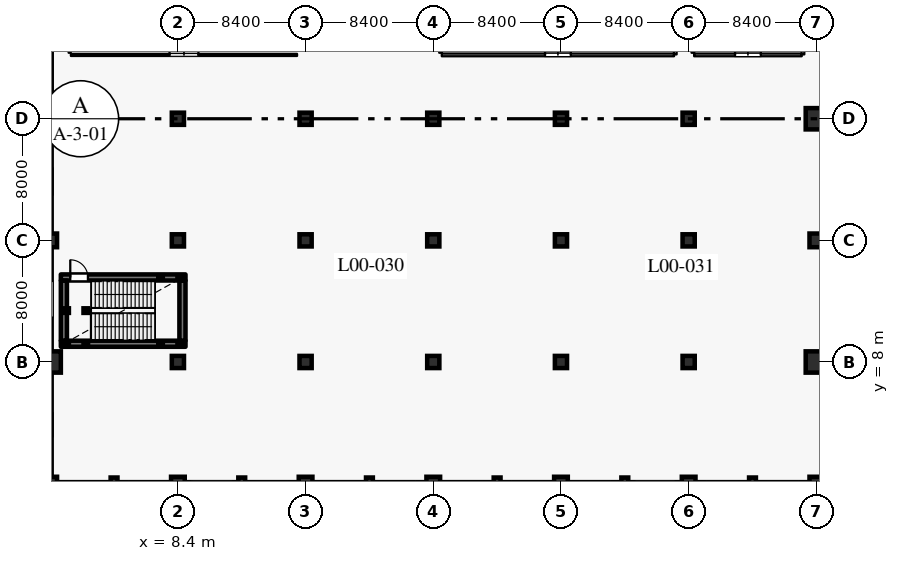
"""IFC4 building model, lengths in metres.
Left out: names, types, materials, properties, quantities, classifications, styles, units other than length and angle.
Written with IfcOpenShell. Run it as: python <this file> out.ifc"""

import sys

from ifc_helpers import new_model, si_unit, direction, frame, frame_2d, origin, origin_with_axes, origin_2d, place, context, subcontext, project, spatial, rectangle, hollow_rectangle, circle, extrude, element, fill, save


model = new_model("IFC4")
c1 = context("Model", 3, precision=1e-05, world=origin(), true_north=direction((0.0, 1.0)))
c2 = subcontext(c1, "Body", "Model", "MODEL_VIEW")
j1 = project(units=[si_unit("LENGTHUNIT", "METRE"), si_unit("PLANEANGLEUNIT", "RADIAN")], contexts=[c1])
p1 = place(None, origin())
s1 = spatial("IfcSite", under=j1, at=p1, CompositionType="ELEMENT")
p2 = place(p1, origin())
s2 = spatial("IfcBuilding", under=s1, at=p2, CompositionType="ELEMENT")
p3 = place(p2, origin())
s3 = spatial("IfcBuildingStorey", under=s2, at=p3, CompositionType="ELEMENT", Elevation=0.0)
p4 = place(p3, origin_with_axes())
e1 = element("IfcColumn", 1, at=p4, inside=s3, PredefinedType="COLUMN", context=c2, shape_type="SweptSolid", body=[
    extrude(rectangle(XDim=0.9, YDim=0.9, at=origin_2d()), origin(), (0.0, 0.0, 1.0), 6.0),
])
p5 = place(p3, frame((0.0, 8.0, 0.0), z_axis=(0.0, 0.0, 1.0), x_axis=(1.0, 0.0, 0.0)))
e2 = element("IfcColumn", 2, at=p5, inside=s3, PredefinedType="COLUMN", context=c2, shape_type="SweptSolid", body=[
    extrude(circle(Radius=0.7, at=origin_2d()), origin(), (0.0, 0.0, 1.0), 6.0),
])
p6 = place(p3, frame((0.0, 16.0, 0.0), z_axis=(0.0, 0.0, 1.0), x_axis=(1.0, 0.0, 0.0)))
e3 = element("IfcColumn", 3, at=p6, inside=s3, PredefinedType="COLUMN", context=c2, shape_type="SweptSolid", body=[
    extrude(rectangle(XDim=0.9, YDim=0.9, at=origin_2d()), origin(), (0.0, 0.0, 1.0), 6.0),
])
p7 = place(p3, frame((0.0, 24.0, 0.0), z_axis=(0.0, 0.0, 1.0), x_axis=(1.0, 0.0, 0.0)))
e4 = element("IfcColumn", 4, at=p7, inside=s3, PredefinedType="COLUMN", context=c2, shape_type="SweptSolid", body=[
    extrude(circle(Radius=0.7, at=origin_2d()), origin(), (0.0, 0.0, 1.0), 6.0),
])
p8 = place(p3, frame((4.2, 0.0, 0.0), z_axis=(0.0, 0.0, 1.0), x_axis=(1.0, 0.0, 0.0)))
e5 = element("IfcColumn", 5, at=p8, inside=s3, PredefinedType="PILASTER", context=c2, shape_type="SweptSolid", body=[
    extrude(rectangle(XDim=0.45, YDim=0.8, at=origin_2d()), origin(), (0.0, 0.0, 1.0), 6.0),
])
p9 = place(p3, frame((8.4, 0.0, 0.0), z_axis=(0.0, 0.0, 1.0), x_axis=(1.0, 0.0, 0.0)))
e6 = element("IfcColumn", 6, at=p9, inside=s3, PredefinedType="COLUMN", context=c2, shape_type="SweptSolid", body=[
    extrude(rectangle(XDim=0.9, YDim=0.9, at=origin_2d()), origin(), (0.0, 0.0, 1.0), 6.0),
])
for number, where, z_axis, x_axis in (
    (7, (8.4, 8.0, 0.0), (0.0, 0.0, 1.0), (1.0, 0.0, 0.0)),
    (8, (8.4, 16.0, 0.0), (0.0, 0.0, 1.0), (1.0, 0.0, 0.0)),
    (9, (8.4, 24.0, 0.0), (0.0, 0.0, 1.0), (1.0, 0.0, 0.0)),
):
    element("IfcColumn", number, at=place(p3, frame(where, z_axis=z_axis, x_axis=x_axis)), inside=s3, PredefinedType="COLUMN", context=c2, shape_type="SweptSolid", body=[
        extrude(rectangle(XDim=0.8, YDim=0.8, at=origin_2d()), origin(), (0.0, 0.0, 1.0), 6.0),
    ])
p10 = place(p3, frame((12.6, 0.0, 0.0), z_axis=(0.0, 0.0, 1.0), x_axis=(1.0, 0.0, 0.0)))
e10 = element("IfcColumn", 10, at=p10, inside=s3, PredefinedType="PILASTER", context=c2, shape_type="SweptSolid", body=[
    extrude(rectangle(XDim=0.45, YDim=0.8, at=origin_2d()), origin(), (0.0, 0.0, 1.0), 6.0),
])
p11 = place(p3, frame((16.8, 0.0, 0.0), z_axis=(0.0, 0.0, 1.0), x_axis=(1.0, 0.0, 0.0)))
e11 = element("IfcColumn", 11, at=p11, inside=s3, PredefinedType="COLUMN", context=c2, shape_type="SweptSolid", body=[
    extrude(rectangle(XDim=0.9, YDim=0.9, at=origin_2d()), origin(), (0.0, 0.0, 1.0), 6.0),
])
for number, where, z_axis, x_axis in (
    (12, (16.8, 8.0, 0.0), (0.0, 0.0, 1.0), (1.0, 0.0, 0.0)),
    (13, (16.8, 16.0, 0.0), (0.0, 0.0, 1.0), (1.0, 0.0, 0.0)),
    (14, (16.8, 24.0, 0.0), (0.0, 0.0, 1.0), (1.0, 0.0, 0.0)),
):
    element("IfcColumn", number, at=place(p3, frame(where, z_axis=z_axis, x_axis=x_axis)), inside=s3, PredefinedType="COLUMN", context=c2, shape_type="SweptSolid", body=[
        extrude(rectangle(XDim=0.8, YDim=0.8, at=origin_2d()), origin(), (0.0, 0.0, 1.0), 6.0),
    ])
p12 = place(p3, frame((21.0, 0.0, 0.0), z_axis=(0.0, 0.0, 1.0), x_axis=(1.0, 0.0, 0.0)))
e15 = element("IfcColumn", 15, at=p12, inside=s3, PredefinedType="PILASTER", context=c2, shape_type="SweptSolid", body=[
    extrude(rectangle(XDim=0.45, YDim=0.8, at=origin_2d()), origin(), (0.0, 0.0, 1.0), 6.0),
])
p13 = place(p3, frame((25.2, 0.0, 0.0), z_axis=(0.0, 0.0, 1.0), x_axis=(1.0, 0.0, 0.0)))
e16 = element("IfcColumn", 16, at=p13, inside=s3, PredefinedType="COLUMN", context=c2, shape_type="SweptSolid", body=[
    extrude(rectangle(XDim=0.9, YDim=0.9, at=origin_2d()), origin(), (0.0, 0.0, 1.0), 6.0),
])
for number, where, z_axis, x_axis in (
    (17, (25.2, 8.0, 0.0), (0.0, 0.0, 1.0), (1.0, 0.0, 0.0)),
    (18, (25.2, 16.0, 0.0), (0.0, 0.0, 1.0), (1.0, 0.0, 0.0)),
    (19, (25.2, 24.0, 0.0), (0.0, 0.0, 1.0), (1.0, 0.0, 0.0)),
):
    element("IfcColumn", number, at=place(p3, frame(where, z_axis=z_axis, x_axis=x_axis)), inside=s3, PredefinedType="COLUMN", context=c2, shape_type="SweptSolid", body=[
        extrude(rectangle(XDim=0.8, YDim=0.8, at=origin_2d()), origin(), (0.0, 0.0, 1.0), 6.0),
    ])
p14 = place(p3, frame((29.4, 0.0, 0.0), z_axis=(0.0, 0.0, 1.0), x_axis=(1.0, 0.0, 0.0)))
e20 = element("IfcColumn", 20, at=p14, inside=s3, PredefinedType="PILASTER", context=c2, shape_type="SweptSolid", body=[
    extrude(rectangle(XDim=0.45, YDim=0.8, at=origin_2d()), origin(), (0.0, 0.0, 1.0), 6.0),
])
p15 = place(p3, frame((33.6, 0.0, 0.0), z_axis=(0.0, 0.0, 1.0), x_axis=(1.0, 0.0, 0.0)))
e21 = element("IfcColumn", 21, at=p15, inside=s3, PredefinedType="COLUMN", context=c2, shape_type="SweptSolid", body=[
    extrude(rectangle(XDim=0.9, YDim=0.9, at=origin_2d()), origin(), (0.0, 0.0, 1.0), 6.0),
])
for number, where, z_axis, x_axis in (
    (22, (33.6, 8.0, 0.0), (0.0, 0.0, 1.0), (1.0, 0.0, 0.0)),
    (23, (33.6, 16.0, 0.0), (0.0, 0.0, 1.0), (1.0, 0.0, 0.0)),
    (24, (33.6, 24.0, 0.0), (0.0, 0.0, 1.0), (1.0, 0.0, 0.0)),
):
    element("IfcColumn", number, at=place(p3, frame(where, z_axis=z_axis, x_axis=x_axis)), inside=s3, PredefinedType="COLUMN", context=c2, shape_type="SweptSolid", body=[
        extrude(rectangle(XDim=0.8, YDim=0.8, at=origin_2d()), origin(), (0.0, 0.0, 1.0), 6.0),
    ])
p16 = place(p3, frame((37.8, 0.0, 0.0), z_axis=(0.0, 0.0, 1.0), x_axis=(1.0, 0.0, 0.0)))
e25 = element("IfcColumn", 25, at=p16, inside=s3, PredefinedType="PILASTER", context=c2, shape_type="SweptSolid", body=[
    extrude(rectangle(XDim=0.45, YDim=0.8, at=origin_2d()), origin(), (0.0, 0.0, 1.0), 6.0),
])
p17 = place(p3, frame((42.0, 0.0, 0.0), z_axis=(0.0, 0.0, 1.0), x_axis=(1.0, 0.0, 0.0)))
e26 = element("IfcColumn", 26, at=p17, inside=s3, PredefinedType="COLUMN", context=c2, shape_type="SweptSolid", body=[
    extrude(rectangle(XDim=0.9, YDim=0.9, at=origin_2d()), origin(), (0.0, 0.0, 1.0), 6.0),
])
for number, where, z_axis, x_axis in (
    (27, (42.0, 8.0, 0.0), (0.0, 0.0, 1.0), (1.0, 0.0, 0.0)),
    (28, (42.0, 16.0, 0.0), (0.0, 0.0, 1.0), (1.0, 0.0, 0.0)),
    (29, (42.0, 24.0, 0.0), (0.0, 0.0, 1.0), (1.0, 0.0, 0.0)),
):
    element("IfcColumn", number, at=place(p3, frame(where, z_axis=z_axis, x_axis=x_axis)), inside=s3, PredefinedType="COLUMN", context=c2, shape_type="SweptSolid", body=[
        extrude(rectangle(XDim=0.8, YDim=0.8, at=origin_2d()), origin(), (0.0, 0.0, 1.0), 6.0),
    ])
p18 = place(p3, frame((46.2, 0.0, 0.0), z_axis=(0.0, 0.0, 1.0), x_axis=(1.0, 0.0, 0.0)))
e30 = element("IfcColumn", 30, at=p18, inside=s3, PredefinedType="PILASTER", context=c2, shape_type="SweptSolid", body=[
    extrude(rectangle(XDim=0.45, YDim=0.8, at=origin_2d()), origin(), (0.0, 0.0, 1.0), 6.0),
])
p19 = place(p3, frame((50.4, 0.0, 0.0), z_axis=(0.0, 0.0, 1.0), x_axis=(1.0, 0.0, 0.0)))
e31 = element("IfcColumn", 31, at=p19, inside=s3, PredefinedType="COLUMN", context=c2, shape_type="SweptSolid", body=[
    extrude(rectangle(XDim=0.9, YDim=0.9, at=origin_2d()), origin(), (0.0, 0.0, 1.0), 6.0),
])
p20 = place(p3, frame((50.4, 8.0, 0.0), z_axis=(0.0, 0.0, 1.0), x_axis=(1.0, 0.0, 0.0)))
e32 = element("IfcColumn", 32, at=p20, inside=s3, PredefinedType="COLUMN", context=c2, shape_type="SweptSolid", body=[
    extrude(circle(Radius=0.7, at=origin_2d()), origin(), (0.0, 0.0, 1.0), 6.0),
])
p21 = place(p3, frame((50.4, 16.0, 0.0), z_axis=(0.0, 0.0, 1.0), x_axis=(1.0, 0.0, 0.0)))
e33 = element("IfcColumn", 33, at=p21, inside=s3, PredefinedType="COLUMN", context=c2, shape_type="SweptSolid", body=[
    extrude(rectangle(XDim=0.9, YDim=0.9, at=origin_2d()), origin(), (0.0, 0.0, 1.0), 6.0),
])
p22 = place(p3, frame((50.4, 24.0, 0.0), z_axis=(0.0, 0.0, 1.0), x_axis=(1.0, 0.0, 0.0)))
e34 = element("IfcColumn", 34, at=p22, inside=s3, PredefinedType="COLUMN", context=c2, shape_type="SweptSolid", body=[
    extrude(circle(Radius=0.7, at=origin_2d()), origin(), (0.0, 0.0, 1.0), 6.0),
])
p23 = place(p3, frame((0.0, 0.45, 0.0), z_axis=(0.0, 0.0, 1.0), x_axis=(0.0, 1.0, 0.0)))
e35 = element("IfcWall", 35, at=p23, inside=s3, PredefinedType="SOLIDWALL", context=c2, shape_type="SweptSolid", body=[
    extrude(rectangle(XDim=6.85, YDim=0.34, at=frame_2d((3.425, 0.0))), origin(), (0.0, 0.0, 1.0), 5.0),
])
p24 = place(p23, frame((2.625, 0.0, 1.0)))
e36 = element("IfcOpeningElement", 36, at=p24, cuts=e35, PredefinedType="OPENING", context=c2, shape_type="SweptSolid", body=[
    extrude(rectangle(XDim=1.6, YDim=1.6, at=frame_2d((0.8, 0.8))), frame((0.0, 0.18, 0.0), z_axis=(0.0, -1.0, 0.0), x_axis=(1.0, 0.0, 0.0)), (0.0, 0.0, 1.0), 0.36),
])
p25 = place(p3, frame((0.0, 8.7, 0.0), z_axis=(0.0, 0.0, 1.0), x_axis=(0.0, 1.0, 0.0)))
e37 = element("IfcWall", 37, at=p25, inside=s3, PredefinedType="SOLIDWALL", context=c2, shape_type="SweptSolid", body=[
    extrude(rectangle(XDim=6.85, YDim=0.34, at=frame_2d((3.425, 0.0))), origin(), (0.0, 0.0, 1.0), 5.0),
])
p26 = place(p25, frame((2.225, 0.0, 0.0)))
e38 = element("IfcOpeningElement", 38, at=p26, cuts=e37, PredefinedType="OPENING", context=c2, shape_type="SweptSolid", body=[
    extrude(rectangle(XDim=2.4, YDim=2.6, at=frame_2d((1.2, 1.3))), frame((0.0, 0.18, 0.0), z_axis=(0.0, -1.0, 0.0), x_axis=(1.0, 0.0, 0.0)), (0.0, 0.0, 1.0), 0.36),
])
p27 = place(p3, frame((0.0, 16.45, 0.0), z_axis=(0.0, 0.0, 1.0), x_axis=(0.0, 1.0, 0.0)))
e39 = element("IfcWall", 39, at=p27, inside=s3, PredefinedType="SOLIDWALL", context=c2, shape_type="SweptSolid", body=[
    extrude(rectangle(XDim=6.85, YDim=0.34, at=frame_2d((3.425, 0.0))), origin(), (0.0, 0.0, 1.0), 5.0),
])
p28 = place(p27, frame((2.525, 0.0, 1.0)))
e40 = element("IfcOpeningElement", 40, at=p28, cuts=e39, PredefinedType="OPENING", context=c2, shape_type="SweptSolid", body=[
    extrude(rectangle(XDim=1.8, YDim=1.7, at=frame_2d((0.9, 0.85))), frame((0.0, 0.18, 0.0), z_axis=(0.0, -1.0, 0.0), x_axis=(1.0, 0.0, 0.0)), (0.0, 0.0, 1.0), 0.36),
])
p29 = place(p3, frame((0.0, 24.7, 0.0), z_axis=(0.0, 0.0, 1.0), x_axis=(0.0, 1.0, 0.0)))
e41 = element("IfcWall", 41, at=p29, inside=s3, PredefinedType="SOLIDWALL", context=c2, shape_type="SweptSolid", body=[
    extrude(rectangle(XDim=6.85, YDim=0.34, at=frame_2d((3.425, 0.0))), origin(), (0.0, 0.0, 1.0), 5.0),
])
p30 = place(p29, frame((1.025, 0.0, 1.0)))
e42 = element("IfcOpeningElement", 42, at=p30, cuts=e41, PredefinedType="OPENING", context=c2, shape_type="SweptSolid", body=[
    extrude(rectangle(XDim=4.8, YDim=3.2, at=frame_2d((2.4, 1.6))), frame((0.0, 0.18, 0.0), z_axis=(0.0, -1.0, 0.0), x_axis=(1.0, 0.0, 0.0)), (0.0, 0.0, 1.0), 0.36),
])
p31 = place(p3, frame((0.7, 9.2, 0.0), z_axis=(0.0, 0.0, 1.0), x_axis=(1.0, 0.0, 0.0)))
e43 = element("IfcWall", 43, at=p31, inside=s3, PredefinedType="SHEAR", context=c2, shape_type="SweptSolid", body=[
    extrude(rectangle(XDim=8.2, YDim=0.4, at=frame_2d((4.1, 0.0))), origin(), (0.0, 0.0, 1.0), 5.675),
])
p32 = place(p3, frame((8.7, 9.405, 0.0), z_axis=(0.0, 0.0, 1.0), x_axis=(0.0, 1.0, 0.0)))
e44 = element("IfcWall", 44, at=p32, inside=s3, PredefinedType="SHEAR", context=c2, shape_type="SweptSolid", body=[
    extrude(rectangle(XDim=3.95, YDim=0.4, at=frame_2d((1.975, 0.0))), origin(), (0.0, 0.0, 1.0), 5.675),
])
p33 = place(p3, frame((0.7, 13.56, 0.0), z_axis=(0.0, 0.0, 1.0), x_axis=(1.0, 0.0, 0.0)))
e45 = element("IfcWall", 45, at=p33, inside=s3, PredefinedType="SHEAR", context=c2, shape_type="SweptSolid", body=[
    extrude(rectangle(XDim=8.2, YDim=0.4, at=frame_2d((4.1, 0.0))), origin(), (0.0, 0.0, 1.0), 5.675),
])
p34 = place(p33, frame((0.62, 0.0, 0.0)))
e46 = element("IfcOpeningElement", 46, at=p34, cuts=e45, PredefinedType="OPENING", context=c2, shape_type="SweptSolid", body=[
    extrude(rectangle(XDim=1.16, YDim=2.2, at=frame_2d((0.58, 1.1))), frame((0.0, 0.21, 0.0), z_axis=(0.0, -1.0, 0.0), x_axis=(1.0, 0.0, 0.0)), (0.0, 0.0, 1.0), 0.42),
])
p35 = place(p3, frame((0.9, 9.405, 0.0), z_axis=(0.0, 0.0, 1.0), x_axis=(0.0, 1.0, 0.0)))
e47 = element("IfcWall", 47, at=p35, inside=s3, PredefinedType="SHEAR", context=c2, shape_type="SweptSolid", body=[
    extrude(rectangle(XDim=3.95, YDim=0.4, at=frame_2d((1.975, 0.0))), origin(), (0.0, 0.0, 1.0), 5.675),
])
for number, where, z_axis, x_axis in (
    (48, (1.08, 9.2, 0.0), (0.0, 0.0, 1.0), (1.0, 0.0, 0.0)),
    (49, (1.08, 11.38, 0.0), (0.0, 0.0, 1.0), (1.0, 0.0, 0.0)),
    (50, (2.34, 9.2, 0.0), (0.0, 0.0, 1.0), (1.0, 0.0, 0.0)),
    (51, (2.34, 11.38, 0.0), (0.0, 0.0, 1.0), (1.0, 0.0, 0.0)),
):
    element("IfcColumn", number, at=place(p3, frame(where, z_axis=z_axis, x_axis=x_axis)), inside=s3, PredefinedType="COLUMN", context=c2, shape_type="SweptSolid", body=[
        extrude(hollow_rectangle(XDim=0.3, YDim=0.3, WallThickness=0.012, at=origin_2d()), origin(), (0.0, 0.0, 1.0), 5.82),
    ])
for number, where, z_axis, x_axis in (
    (52, (7.26, 9.2, -2.7), (0.0, 0.0, 1.0), (1.0, 0.0, 0.0)),
    (53, (7.26, 13.56, -2.7), (0.0, 0.0, 1.0), (1.0, 0.0, 0.0)),
    (54, (8.52, 9.2, -2.7), (0.0, 0.0, 1.0), (1.0, 0.0, 0.0)),
    (55, (8.52, 13.56, -2.7), (0.0, 0.0, 1.0), (1.0, 0.0, 0.0)),
):
    element("IfcColumn", number, at=place(p3, frame(where, z_axis=z_axis, x_axis=x_axis)), inside=s3, PredefinedType="COLUMN", context=c2, shape_type="SweptSolid", body=[
        extrude(hollow_rectangle(XDim=0.3, YDim=0.3, WallThickness=0.012, at=origin_2d()), origin(), (0.0, 0.0, 1.0), 5.52),
    ])
p36 = place(p3, frame((1.36, 28.2, 0.0), z_axis=(0.0, 0.0, 1.0), x_axis=(1.0, 0.0, 0.0)))
e56 = element("IfcWall", 56, at=p36, inside=s3, PredefinedType="PARTITIONING", context=c2, shape_type="SweptSolid", body=[
    extrude(rectangle(XDim=14.88, YDim=0.14, at=frame_2d((7.44, 0.0))), origin(), (0.0, 0.0, 1.0), 5.675),
])
p37 = place(p36, frame((6.49, 0.0, 0.0)))
e57 = element("IfcOpeningElement", 57, at=p37, cuts=e56, PredefinedType="OPENING", context=c2, shape_type="SweptSolid", body=[
    extrude(rectangle(XDim=1.9, YDim=2.4, at=frame_2d((0.95, 1.2))), frame((0.0, 0.08, 0.0), z_axis=(0.0, -1.0, 0.0), x_axis=(1.0, 0.0, 0.0)), (0.0, 0.0, 1.0), 0.16),
])
p38 = place(p3, frame((1.28, 28.34, 0.0), z_axis=(0.0, 0.0, 1.0), x_axis=(0.0, 1.0, 0.0)))
e58 = element("IfcWall", 58, at=p38, inside=s3, PredefinedType="PARTITIONING", context=c2, shape_type="SweptSolid", body=[
    extrude(rectangle(XDim=26.01, YDim=0.14, at=frame_2d((13.005, 0.0))), origin(), (0.0, 0.0, 1.0), 5.675),
])
p39 = place(p3, frame((25.76, 28.2, 0.0), z_axis=(0.0, 0.0, 1.0), x_axis=(1.0, 0.0, 0.0)))
e59 = element("IfcWall", 59, at=p39, inside=s3, PredefinedType="PARTITIONING", context=c2, shape_type="SweptSolid", body=[
    extrude(rectangle(XDim=15.28, YDim=0.18, at=frame_2d((7.64, 0.0))), origin(), (0.0, 0.0, 1.0), 5.675),
])
p40 = place(p39, frame((6.79, 0.0, 0.0)))
e60 = element("IfcOpeningElement", 60, at=p40, cuts=e59, PredefinedType="OPENING", context=c2, shape_type="SweptSolid", body=[
    extrude(rectangle(XDim=1.7, YDim=2.3, at=frame_2d((0.85, 1.15))), frame((0.0, 0.1, 0.0), z_axis=(0.0, -1.0, 0.0), x_axis=(1.0, 0.0, 0.0)), (0.0, 0.0, 1.0), 0.2),
])
p41 = place(p3, frame((25.68, 28.34, 0.0), z_axis=(0.0, 0.0, 1.0), x_axis=(0.0, 1.0, 0.0)))
e61 = element("IfcWall", 61, at=p41, inside=s3, PredefinedType="PARTITIONING", context=c2, shape_type="SweptSolid", body=[
    extrude(rectangle(XDim=14.21, YDim=0.18, at=frame_2d((7.105, 0.0))), origin(), (0.0, 0.0, 1.0), 5.675),
])
p42 = place(p3, frame((42.36, 28.2, 0.0), z_axis=(0.0, 0.0, 1.0), x_axis=(1.0, 0.0, 0.0)))
e62 = element("IfcWall", 62, at=p42, inside=s3, PredefinedType="PARTITIONING", context=c2, shape_type="SweptSolid", body=[
    extrude(rectangle(XDim=7.08, YDim=0.18, at=frame_2d((3.54, 0.0))), origin(), (0.0, 0.0, 1.0), 5.675),
])
p43 = place(p42, frame((2.69, 0.0, 0.0)))
e63 = element("IfcOpeningElement", 63, at=p43, cuts=e62, PredefinedType="OPENING", context=c2, shape_type="SweptSolid", body=[
    extrude(rectangle(XDim=1.7, YDim=2.3, at=frame_2d((0.85, 1.15))), frame((0.0, 0.1, 0.0), z_axis=(0.0, -1.0, 0.0), x_axis=(1.0, 0.0, 0.0)), (0.0, 0.0, 1.0), 0.2),
])
p44 = place(p3, frame((42.28, 28.34, 0.0), z_axis=(0.0, 0.0, 1.0), x_axis=(0.0, 1.0, 0.0)))
e64 = element("IfcWall", 64, at=p44, inside=s3, PredefinedType="PARTITIONING", context=c2, shape_type="SweptSolid", body=[
    extrude(rectangle(XDim=14.21, YDim=0.18, at=frame_2d((7.105, 0.0))), origin(), (0.0, 0.0, 1.0), 5.675),
])
for number, where, z_axis, x_axis in (
    (65, (41.12, 28.232, 0.0), (0.0, 0.0, 1.0), (0.0, 1.0, 0.0)),
    (66, (49.52, 28.232, 0.0), (0.0, 0.0, 1.0), (0.0, 1.0, 0.0)),
):
    element("IfcWall", number, at=place(p3, frame(where, z_axis=z_axis, x_axis=x_axis)), inside=s3, PredefinedType="PARTITIONING", context=c2, shape_type="SweptSolid", body=[
        extrude(rectangle(XDim=14.568, YDim=0.18, at=frame_2d((7.284, 0.0))), origin(), (0.0, 0.0, 1.0), 5.675),
    ])
p45 = place(p34, origin())
e67 = element("IfcDoor", 67, at=p45, inside=s3, OperationType="SINGLE_SWING_LEFT", PredefinedType="DOOR", context=c2, shape_type="SweptSolid", body=[
    extrude(rectangle(XDim=1.16, YDim=2.2, at=frame_2d((0.58, 1.1))), frame((0.0, 0.025, 0.0), z_axis=(0.0, -1.0, 0.0), x_axis=(1.0, 0.0, 0.0)), (0.0, 0.0, 1.0), 0.05),
])
fill(e46, e67)
p46 = place(p37, origin())
e68 = element("IfcDoor", 68, at=p46, inside=s3, OperationType="DOUBLE_DOOR_SINGLE_SWING", PredefinedType="DOOR", context=c2, shape_type="SweptSolid", body=[
    extrude(rectangle(XDim=1.9, YDim=2.4, at=frame_2d((0.95, 1.2))), frame((0.0, 0.025, 0.0), z_axis=(0.0, -1.0, 0.0), x_axis=(1.0, 0.0, 0.0)), (0.0, 0.0, 1.0), 0.05),
])
fill(e57, e68)
p47 = place(p40, origin())
e69 = element("IfcDoor", 69, at=p47, inside=s3, OperationType="DOUBLE_DOOR_SINGLE_SWING", PredefinedType="DOOR", context=c2, shape_type="SweptSolid", body=[
    extrude(rectangle(XDim=1.7, YDim=2.3, at=frame_2d((0.85, 1.15))), frame((0.0, 0.025, 0.0), z_axis=(0.0, -1.0, 0.0), x_axis=(1.0, 0.0, 0.0)), (0.0, 0.0, 1.0), 0.05),
])
fill(e60, e69)
p48 = place(p43, origin())
e70 = element("IfcDoor", 70, at=p48, inside=s3, OperationType="DOUBLE_DOOR_SINGLE_SWING", PredefinedType="DOOR", context=c2, shape_type="SweptSolid", body=[
    extrude(rectangle(XDim=1.7, YDim=2.3, at=frame_2d((0.85, 1.15))), frame((0.0, 0.025, 0.0), z_axis=(0.0, -1.0, 0.0), x_axis=(1.0, 0.0, 0.0)), (0.0, 0.0, 1.0), 0.05),
])
fill(e63, e70)
save(model, sys.argv[1])
